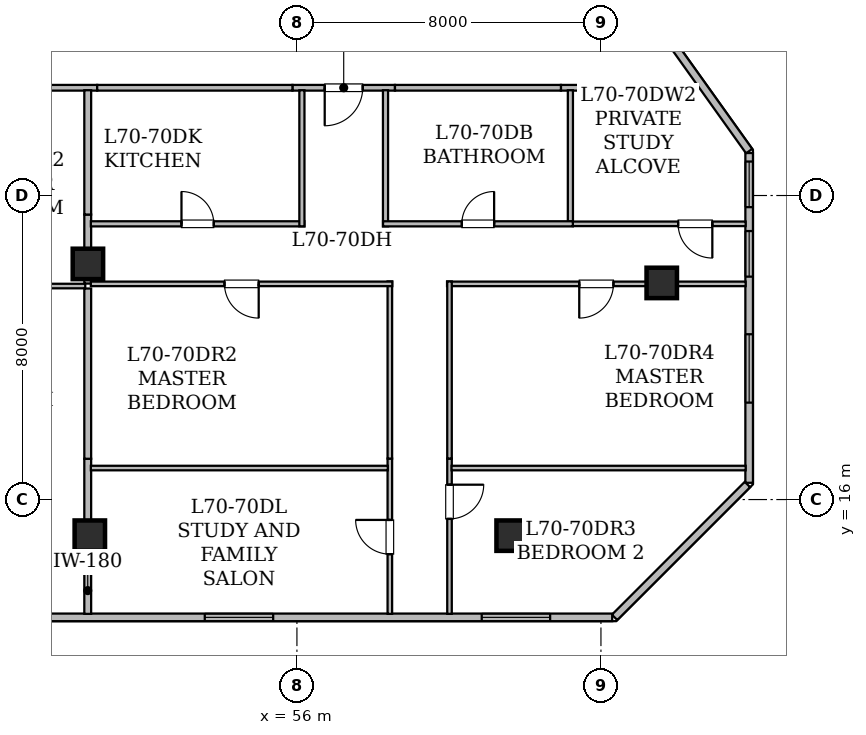
"""IFC4 building model, lengths in metres.
Left out: names, types, materials, properties, quantities, classifications, styles, units other than length and angle.
Written with IfcOpenShell. Run it as: python <this file> out.ifc"""

import sys

from ifc_helpers import new_model, si_unit, direction, frame, frame_2d, origin, origin_2d, place, context, subcontext, project, spatial, rectangle, hollow_rectangle, extrude, element, fill, save


model = new_model("IFC4")
c1 = context("Model", 3, precision=1e-05, world=origin(), true_north=direction((0.0, 1.0)))
c2 = subcontext(c1, "Body", "Model", "MODEL_VIEW")
j1 = project(units=[si_unit("LENGTHUNIT", "METRE"), si_unit("PLANEANGLEUNIT", "RADIAN")], contexts=[c1])
p1 = place(None, origin())
s1 = spatial("IfcSite", under=j1, at=p1, CompositionType="ELEMENT")
p2 = place(p1, origin())
s2 = spatial("IfcBuilding", under=s1, at=p2, CompositionType="ELEMENT")
p3 = place(p2, frame((0.0, 0.0, 273.65)))
s3 = spatial("IfcBuildingStorey", under=s2, at=p3, CompositionType="ELEMENT", Elevation=273.65)
for number, where, z_axis, x_axis in (
    (1, (50.55, 15.05, 0.0), (0.0, 0.0, 1.0), (1.0, 0.0, 0.0)),
    (2, (61.65, 15.05, 0.0), (0.0, 0.0, 1.0), (1.0, 0.0, 0.0)),
    (3, (65.6, 21.7, 0.0), (0.0, 0.0, 1.0), (1.0, 0.0, 0.0)),
):
    element("IfcColumn", number, at=place(p3, frame(where, z_axis=z_axis, x_axis=x_axis)), inside=s3, PredefinedType="COLUMN", context=c2, shape_type="SweptSolid", body=[
        extrude(hollow_rectangle(XDim=0.8, YDim=0.8, WallThickness=0.04, at=origin_2d()), origin(), (0.0, 0.0, 1.0), 4.175),
    ])
p4 = place(p3, frame((50.5, 22.2, 0.0), z_axis=(0.0, 0.0, 1.0), x_axis=(1.0, 0.0, 0.0)))
e4 = element("IfcColumn", 4, at=p4, inside=s3, PredefinedType="COLUMN", context=c2, shape_type="SweptSolid", body=[
    extrude(hollow_rectangle(XDim=0.8, YDim=0.8, WallThickness=0.04, at=origin_2d()), origin(), (0.0, 0.0, 1.0), 4.2),
])
p5 = place(p3, frame((65.926, 27.931, 0.0), z_axis=(0.0, 0.0, 1.0), x_axis=(0.581306204583, -0.813684887726, 0.0)))
e5 = element("IfcWall", 5, at=p5, inside=s3, PredefinedType="STANDARD", context=c2, shape_type="SweptSolid", body=[
    extrude(rectangle(XDim=3.396, YDim=0.2, at=frame_2d((1.698, 0.0))), origin(), (0.0, 0.0, 1.0), 3.78),
])
p6 = place(p3, frame((67.9, 25.118, 0.0), z_axis=(0.0, 0.0, 1.0), x_axis=(0.0, -1.0, 0.0)))
e6 = element("IfcWall", 6, at=p6, inside=s3, PredefinedType="STANDARD", context=c2, shape_type="SweptSolid", body=[
    extrude(rectangle(XDim=8.677, YDim=0.2, at=frame_2d((4.338, 0.0))), origin(), (0.0, 0.0, 1.0), 3.78),
])
p7 = place(p6, frame((0.224, 0.0, 0.78)))
e7 = element("IfcOpeningElement", 7, at=p7, cuts=e6, PredefinedType="OPENING", context=c2, shape_type="SweptSolid", body=[
    extrude(rectangle(XDim=1.2, YDim=1.5, at=frame_2d((0.6, 0.75))), frame((0.0, 0.11, 0.0), z_axis=(0.0, -1.0, 0.0), x_axis=(1.0, 0.0, 0.0)), (0.0, 0.0, 1.0), 0.22),
])
p8 = place(p6, frame((2.053, 0.0, 0.78)))
e8 = element("IfcOpeningElement", 8, at=p8, cuts=e6, PredefinedType="OPENING", context=c2, shape_type="SweptSolid", body=[
    extrude(rectangle(XDim=1.2, YDim=1.5, at=frame_2d((0.6, 0.75))), frame((0.0, 0.11, 0.0), z_axis=(0.0, -1.0, 0.0), x_axis=(1.0, 0.0, 0.0)), (0.0, 0.0, 1.0), 0.22),
])
p9 = place(p6, frame((4.768, 0.0, 0.85)))
e9 = element("IfcOpeningElement", 9, at=p9, cuts=e6, PredefinedType="OPENING", context=c2, shape_type="SweptSolid", body=[
    extrude(rectangle(XDim=1.8, YDim=0.92, at=frame_2d((0.9, 0.46))), frame((0.0, 0.11, 0.0), z_axis=(0.0, -1.0, 0.0), x_axis=(1.0, 0.0, 0.0)), (0.0, 0.0, 1.0), 0.22),
])
p10 = place(p3, frame((67.855, 16.396, 0.0), z_axis=(0.0, 0.0, 1.0), x_axis=(-0.707106781187, -0.707106781187, 0.0)))
e10 = element("IfcWall", 10, at=p10, inside=s3, PredefinedType="STANDARD", context=c2, shape_type="SweptSolid", body=[
    extrude(rectangle(XDim=4.944, YDim=0.2, at=frame_2d((2.472, 0.0))), origin(), (0.0, 0.0, 1.0), 3.78),
])
p11 = place(p3, frame((64.296, 12.9, 0.0), z_axis=(0.0, 0.0, 1.0), x_axis=(-1.0, 0.0, 0.0)))
e11 = element("IfcWall", 11, at=p11, inside=s3, PredefinedType="STANDARD", context=c2, shape_type="SweptSolid", body=[
    extrude(rectangle(XDim=38.593, YDim=0.2, at=frame_2d((19.296, 0.0))), origin(), (0.0, 0.0, 1.0), 3.78),
])
p12 = place(p11, frame((29.086, 0.0, 0.85)))
e12 = element("IfcOpeningElement", 12, at=p12, cuts=e11, PredefinedType="OPENING", context=c2, shape_type="SweptSolid", body=[
    extrude(rectangle(XDim=1.8, YDim=0.92, at=frame_2d((0.9, 0.46))), frame((0.0, 0.11, 0.0), z_axis=(0.0, -1.0, 0.0), x_axis=(1.0, 0.0, 0.0)), (0.0, 0.0, 1.0), 0.22),
])
p13 = place(p11, frame((18.761, 0.0, 0.78)))
e13 = element("IfcOpeningElement", 13, at=p13, cuts=e11, PredefinedType="OPENING", context=c2, shape_type="SweptSolid", body=[
    extrude(rectangle(XDim=1.2, YDim=1.5, at=frame_2d((0.6, 0.75))), frame((0.0, 0.11, 0.0), z_axis=(0.0, -1.0, 0.0), x_axis=(1.0, 0.0, 0.0)), (0.0, 0.0, 1.0), 0.22),
])
p14 = place(p11, frame((15.286, 0.0, 0.85)))
e14 = element("IfcOpeningElement", 14, at=p14, cuts=e11, PredefinedType="OPENING", context=c2, shape_type="SweptSolid", body=[
    extrude(rectangle(XDim=1.8, YDim=0.92, at=frame_2d((0.9, 0.46))), frame((0.0, 0.11, 0.0), z_axis=(0.0, -1.0, 0.0), x_axis=(1.0, 0.0, 0.0)), (0.0, 0.0, 1.0), 0.22),
])
p15 = place(p11, frame((8.921, 0.0, 0.85)))
e15 = element("IfcOpeningElement", 15, at=p15, cuts=e11, PredefinedType="OPENING", context=c2, shape_type="SweptSolid", body=[
    extrude(rectangle(XDim=1.8, YDim=0.92, at=frame_2d((0.9, 0.46))), frame((0.0, 0.11, 0.0), z_axis=(0.0, -1.0, 0.0), x_axis=(1.0, 0.0, 0.0)), (0.0, 0.0, 1.0), 0.22),
])
p16 = place(p11, frame((1.633, 0.0, 0.85)))
e16 = element("IfcOpeningElement", 16, at=p16, cuts=e11, PredefinedType="OPENING", context=c2, shape_type="SweptSolid", body=[
    extrude(rectangle(XDim=1.8, YDim=0.92, at=frame_2d((0.9, 0.46))), frame((0.0, 0.11, 0.0), z_axis=(0.0, -1.0, 0.0), x_axis=(1.0, 0.0, 0.0)), (0.0, 0.0, 1.0), 0.22),
])
p17 = place(p3, frame((50.744, 26.835, 0.0), z_axis=(0.0, 0.0, 1.0), x_axis=(-1.0, 0.0, 0.0)))
e17 = element("IfcWall", 17, at=p17, inside=s3, PredefinedType="STANDARD", context=c2, shape_type="SweptSolid", body=[
    extrude(rectangle(XDim=4.77, YDim=0.15, at=frame_2d((2.385, 0.0))), origin(), (0.0, 0.0, 1.0), 2.22),
])
p18 = place(p3, frame((63.69, 26.835, 0.0), z_axis=(0.0, 0.0, 1.0), x_axis=(-1.0, 0.0, 0.0)))
e18 = element("IfcWall", 18, at=p18, inside=s3, PredefinedType="STANDARD", context=c2, shape_type="SweptSolid", body=[
    extrude(rectangle(XDim=0.743, YDim=0.15, at=frame_2d((0.372, 0.0))), origin(), (0.0, 0.0, 1.0), 3.78),
])
p19 = place(p3, frame((58.58, 26.835, 0.0), z_axis=(0.0, 0.0, 1.0), x_axis=(-1.0, 0.0, 0.0)))
e19 = element("IfcWall", 19, at=p19, inside=s3, PredefinedType="STANDARD", context=c2, shape_type="SweptSolid", body=[
    extrude(rectangle(XDim=2.698, YDim=0.15, at=frame_2d((1.349, 0.0))), origin(), (0.0, 0.0, 1.0), 3.78),
])
p20 = place(p19, frame((0.849, 0.0, 0.0)))
e20 = element("IfcOpeningElement", 20, at=p20, cuts=e19, PredefinedType="OPENING", context=c2, shape_type="SweptSolid", body=[
    extrude(rectangle(XDim=1.0, YDim=2.15, at=frame_2d((0.5, 1.075))), frame((0.0, 0.085, 0.0), z_axis=(0.0, -1.0, 0.0), x_axis=(1.0, 0.0, 0.0)), (0.0, 0.0, 1.0), 0.17),
])
p21 = place(p3, frame((62.947, 26.835, 0.0), z_axis=(0.0, 0.0, 1.0), x_axis=(-1.0, 0.0, 0.0)))
e21 = element("IfcWall", 21, at=p21, inside=s3, PredefinedType="STANDARD", context=c2, shape_type="SweptSolid", body=[
    extrude(rectangle(XDim=4.367, YDim=0.15, at=frame_2d((2.184, 0.0))), origin(), (0.0, 0.0, 1.0), 3.78),
])
p22 = place(p3, frame((55.882, 26.835, 0.0), z_axis=(0.0, 0.0, 1.0), x_axis=(-1.0, 0.0, 0.0)))
e22 = element("IfcWall", 22, at=p22, inside=s3, PredefinedType="STANDARD", context=c2, shape_type="SweptSolid", body=[
    extrude(rectangle(XDim=5.138, YDim=0.15, at=frame_2d((2.569, 0.0))), origin(), (0.0, 0.0, 1.0), 2.22),
])
p23 = place(p3, frame((45.779, 21.618, 0.0), z_axis=(0.0, 0.0, 1.0), x_axis=(1.0, 0.0, 0.0)))
e23 = element("IfcWall", 23, at=p23, inside=s3, PredefinedType="PARTITIONING", context=c2, shape_type="SweptSolid", body=[
    extrude(rectangle(XDim=4.651, YDim=0.12, at=frame_2d((2.325, 0.0))), origin(), (0.0, 0.0, 1.0), 2.22),
])
p24 = place(p3, frame((50.495, 17.073, 0.0), z_axis=(0.0, 0.0, 1.0), x_axis=(0.0, -1.0, 0.0)))
e24 = element("IfcWall", 24, at=p24, inside=s3, PredefinedType="STANDARD", context=c2, shape_type="SweptSolid", body=[
    extrude(rectangle(XDim=4.081, YDim=0.18, at=frame_2d((2.041, 0.0))), origin(), (0.0, 0.0, 1.0), 2.22),
])
p25 = place(p3, frame((50.495, 21.553, 0.0), z_axis=(0.0, 0.0, 1.0), x_axis=(0.0, -1.0, 0.0)))
e25 = element("IfcWall", 25, at=p25, inside=s3, PredefinedType="STANDARD", context=c2, shape_type="SweptSolid", body=[
    extrude(rectangle(XDim=4.48, YDim=0.18, at=frame_2d((2.24, 0.0))), origin(), (0.0, 0.0, 1.0), 2.22),
])
p26 = place(p3, frame((50.495, 23.499, 0.0), z_axis=(0.0, 0.0, 1.0), x_axis=(0.0, -1.0, 0.0)))
e26 = element("IfcWall", 26, at=p26, inside=s3, PredefinedType="STANDARD", context=c2, shape_type="SweptSolid", body=[
    extrude(rectangle(XDim=1.816, YDim=0.18, at=frame_2d((0.908, 0.0))), origin(), (0.0, 0.0, 1.0), 2.22),
])
p27 = place(p3, frame((50.495, 26.77, 0.0), z_axis=(0.0, 0.0, 1.0), x_axis=(0.0, -1.0, 0.0)))
e27 = element("IfcWall", 27, at=p27, inside=s3, PredefinedType="STANDARD", context=c2, shape_type="SweptSolid", body=[
    extrude(rectangle(XDim=3.271, YDim=0.18, at=frame_2d((1.635, 0.0))), origin(), (0.0, 0.0, 1.0), 2.22),
])
p28 = place(p3, frame((67.808, 23.255, 0.0), z_axis=(0.0, 0.0, 1.0), x_axis=(-1.0, 0.0, 0.0)))
e28 = element("IfcWall", 28, at=p28, inside=s3, PredefinedType="PARTITIONING", context=c2, shape_type="SweptSolid", body=[
    extrude(rectangle(XDim=4.547, YDim=0.12, at=frame_2d((2.273, 0.0))), origin(), (0.0, 0.0, 1.0), 2.22),
])
p29 = place(p28, frame((0.877, 0.0, 0.0)))
e29 = element("IfcOpeningElement", 29, at=p29, cuts=e28, PredefinedType="OPENING", context=c2, shape_type="SweptSolid", body=[
    extrude(rectangle(XDim=0.9, YDim=2.1, at=frame_2d((0.45, 1.05))), frame((0.0, 0.07, 0.0), z_axis=(0.0, -1.0, 0.0), x_axis=(1.0, 0.0, 0.0)), (0.0, 0.0, 1.0), 0.14),
])
p30 = place(p3, frame((63.196, 23.32, 0.0), z_axis=(0.0, 0.0, 1.0), x_axis=(0.0, 1.0, 0.0)))
e30 = element("IfcWall", 30, at=p30, inside=s3, PredefinedType="PARTITIONING", context=c2, shape_type="SweptSolid", body=[
    extrude(rectangle(XDim=3.45, YDim=0.135, at=frame_2d((1.725, 0.0))), origin(), (0.0, 0.0, 1.0), 3.78),
])
p31 = place(p3, frame((58.331, 26.77, 0.0), z_axis=(0.0, 0.0, 1.0), x_axis=(0.0, -1.0, 0.0)))
e31 = element("IfcWall", 31, at=p31, inside=s3, PredefinedType="PARTITIONING", context=c2, shape_type="SweptSolid", body=[
    extrude(rectangle(XDim=3.58, YDim=0.135, at=frame_2d((1.79, 0.0))), origin(), (0.0, 0.0, 1.0), 3.78),
])
p32 = place(p3, frame((58.266, 23.255, 0.0), z_axis=(0.0, 0.0, 1.0), x_axis=(1.0, 0.0, 0.0)))
e32 = element("IfcWall", 32, at=p32, inside=s3, PredefinedType="PARTITIONING", context=c2, shape_type="SweptSolid", body=[
    extrude(rectangle(XDim=4.995, YDim=0.135, at=frame_2d((2.498, 0.0))), origin(), (0.0, 0.0, 1.0), 3.78),
])
p33 = place(p32, frame((2.073, 0.0, 0.0)))
e33 = element("IfcOpeningElement", 33, at=p33, cuts=e32, PredefinedType="OPENING", context=c2, shape_type="SweptSolid", body=[
    extrude(rectangle(XDim=0.85, YDim=2.1, at=frame_2d((0.425, 1.05))), frame((0.0, 0.077, 0.0), z_axis=(0.0, -1.0, 0.0), x_axis=(1.0, 0.0, 0.0)), (0.0, 0.0, 1.0), 0.155),
])
p34 = place(p3, frame((50.577, 23.255, 0.0), z_axis=(0.0, 0.0, 1.0), x_axis=(1.0, 0.0, 0.0)))
e34 = element("IfcWall", 34, at=p34, inside=s3, PredefinedType="PARTITIONING", context=c2, shape_type="SweptSolid", body=[
    extrude(rectangle(XDim=5.619, YDim=0.135, at=frame_2d((2.81, 0.0))), origin(), (0.0, 0.0, 1.0), 2.22),
])
p35 = place(p34, frame((2.385, 0.0, 0.0)))
e35 = element("IfcOpeningElement", 35, at=p35, cuts=e34, PredefinedType="OPENING", context=c2, shape_type="SweptSolid", body=[
    extrude(rectangle(XDim=0.85, YDim=2.1, at=frame_2d((0.425, 1.05))), frame((0.0, 0.077, 0.0), z_axis=(0.0, -1.0, 0.0), x_axis=(1.0, 0.0, 0.0)), (0.0, 0.0, 1.0), 0.155),
])
p36 = place(p3, frame((56.131, 23.19, 0.0), z_axis=(0.0, 0.0, 1.0), x_axis=(0.0, 1.0, 0.0)))
e36 = element("IfcWall", 36, at=p36, inside=s3, PredefinedType="PARTITIONING", context=c2, shape_type="SweptSolid", body=[
    extrude(rectangle(XDim=3.58, YDim=0.135, at=frame_2d((1.79, 0.0))), origin(), (0.0, 0.0, 1.0), 3.78),
])
p37 = place(p3, frame((58.445, 12.992, 0.0), z_axis=(0.0, 0.0, 1.0), x_axis=(0.0, 1.0, 0.0)))
e37 = element("IfcWall", 37, at=p37, inside=s3, PredefinedType="PARTITIONING", context=c2, shape_type="SweptSolid", body=[
    extrude(rectangle(XDim=4.086, YDim=0.12, at=frame_2d((2.043, 0.0))), origin(), (0.0, 0.0, 1.0), 2.22),
])
p38 = place(p37, frame((1.572, 0.0, 0.0)))
e38 = element("IfcOpeningElement", 38, at=p38, cuts=e37, PredefinedType="OPENING", context=c2, shape_type="SweptSolid", body=[
    extrude(rectangle(XDim=0.9, YDim=2.1, at=frame_2d((0.45, 1.05))), frame((0.0, 0.07, 0.0), z_axis=(0.0, -1.0, 0.0), x_axis=(1.0, 0.0, 0.0)), (0.0, 0.0, 1.0), 0.14),
])
p39 = place(p3, frame((58.445, 17.078, 0.0), z_axis=(0.0, 0.0, 1.0), x_axis=(0.0, 1.0, 0.0)))
e39 = element("IfcWall", 39, at=p39, inside=s3, PredefinedType="PARTITIONING", context=c2, shape_type="SweptSolid", body=[
    extrude(rectangle(XDim=4.662, YDim=0.12, at=frame_2d((2.331, 0.0))), origin(), (0.0, 0.0, 1.0), 2.22),
])
p40 = place(p3, frame((58.51, 21.675, 0.0), z_axis=(0.0, 0.0, 1.0), x_axis=(-1.0, 0.0, 0.0)))
e40 = element("IfcWall", 40, at=p40, inside=s3, PredefinedType="PARTITIONING", context=c2, shape_type="SweptSolid", body=[
    extrude(rectangle(XDim=7.933, YDim=0.12, at=frame_2d((3.967, 0.0))), origin(), (0.0, 0.0, 1.0), 2.22),
])
p41 = place(p40, frame((3.516, 0.0, 0.0)))
e41 = element("IfcOpeningElement", 41, at=p41, cuts=e40, PredefinedType="OPENING", context=c2, shape_type="SweptSolid", body=[
    extrude(rectangle(XDim=0.9, YDim=2.1, at=frame_2d((0.45, 1.05))), frame((0.0, 0.07, 0.0), z_axis=(0.0, -1.0, 0.0), x_axis=(1.0, 0.0, 0.0)), (0.0, 0.0, 1.0), 0.14),
])
p42 = place(p3, frame((60.015, 17.078, 0.0), z_axis=(0.0, 0.0, 1.0), x_axis=(0.0, -1.0, 0.0)))
e42 = element("IfcWall", 42, at=p42, inside=s3, PredefinedType="PARTITIONING", context=c2, shape_type="SweptSolid", body=[
    extrude(rectangle(XDim=4.086, YDim=0.12, at=frame_2d((2.043, 0.0))), origin(), (0.0, 0.0, 1.0), 2.22),
])
p43 = place(p42, frame((0.687, 0.0, 0.0)))
e43 = element("IfcOpeningElement", 43, at=p43, cuts=e42, PredefinedType="OPENING", context=c2, shape_type="SweptSolid", body=[
    extrude(rectangle(XDim=0.9, YDim=2.1, at=frame_2d((0.45, 1.05))), frame((0.0, 0.07, 0.0), z_axis=(0.0, -1.0, 0.0), x_axis=(1.0, 0.0, 0.0)), (0.0, 0.0, 1.0), 0.14),
])
p44 = place(p3, frame((67.808, 21.675, 0.0), z_axis=(0.0, 0.0, 1.0), x_axis=(-1.0, 0.0, 0.0)))
e44 = element("IfcWall", 44, at=p44, inside=s3, PredefinedType="PARTITIONING", context=c2, shape_type="SweptSolid", body=[
    extrude(rectangle(XDim=7.858, YDim=0.12, at=frame_2d((3.929, 0.0))), origin(), (0.0, 0.0, 1.0), 2.22),
])
p45 = place(p44, frame((3.479, 0.0, 0.0)))
e45 = element("IfcOpeningElement", 45, at=p45, cuts=e44, PredefinedType="OPENING", context=c2, shape_type="SweptSolid", body=[
    extrude(rectangle(XDim=0.9, YDim=2.1, at=frame_2d((0.45, 1.05))), frame((0.0, 0.07, 0.0), z_axis=(0.0, -1.0, 0.0), x_axis=(1.0, 0.0, 0.0)), (0.0, 0.0, 1.0), 0.14),
])
p46 = place(p3, frame((60.015, 21.74, 0.0), z_axis=(0.0, 0.0, 1.0), x_axis=(0.0, -1.0, 0.0)))
e46 = element("IfcWall", 46, at=p46, inside=s3, PredefinedType="PARTITIONING", context=c2, shape_type="SweptSolid", body=[
    extrude(rectangle(XDim=4.662, YDim=0.12, at=frame_2d((2.331, 0.0))), origin(), (0.0, 0.0, 1.0), 2.22),
])
p47 = place(p3, frame((50.577, 16.829, 0.0), z_axis=(0.0, 0.0, 1.0), x_axis=(1.0, 0.0, 0.0)))
e47 = element("IfcWall", 47, at=p47, inside=s3, PredefinedType="PARTITIONING", context=c2, shape_type="SweptSolid", body=[
    extrude(rectangle(XDim=7.814, YDim=0.12, at=frame_2d((3.907, 0.0))), origin(), (0.0, 0.0, 1.0), 2.22),
])
p48 = place(p3, frame((60.069, 16.829, 0.0), z_axis=(0.0, 0.0, 1.0), x_axis=(1.0, 0.0, 0.0)))
e48 = element("IfcWall", 48, at=p48, inside=s3, PredefinedType="PARTITIONING", context=c2, shape_type="SweptSolid", body=[
    extrude(rectangle(XDim=7.739, YDim=0.12, at=frame_2d((3.87, 0.0))), origin(), (0.0, 0.0, 1.0), 2.22),
])
p49 = place(p7, origin())
e49 = element("IfcWindow", 49, at=p49, inside=s3, PartitioningType="SINGLE_PANEL", PredefinedType="WINDOW", context=c2, shape_type="SweptSolid", body=[
    extrude(rectangle(XDim=1.2, YDim=1.5, at=frame_2d((0.6, 0.75))), frame((0.0, 0.03, 0.0), z_axis=(0.0, -1.0, 0.0), x_axis=(1.0, 0.0, 0.0)), (0.0, 0.0, 1.0), 0.06),
])
fill(e7, e49)
p50 = place(p8, origin())
e50 = element("IfcWindow", 50, at=p50, inside=s3, PartitioningType="SINGLE_PANEL", PredefinedType="WINDOW", context=c2, shape_type="SweptSolid", body=[
    extrude(rectangle(XDim=1.2, YDim=1.5, at=frame_2d((0.6, 0.75))), frame((0.0, 0.03, 0.0), z_axis=(0.0, -1.0, 0.0), x_axis=(1.0, 0.0, 0.0)), (0.0, 0.0, 1.0), 0.06),
])
fill(e8, e50)
p51 = place(p15, origin())
e51 = element("IfcWindow", 51, at=p51, inside=s3, PartitioningType="SINGLE_PANEL", PredefinedType="WINDOW", context=c2, shape_type="SweptSolid", body=[
    extrude(rectangle(XDim=1.8, YDim=0.92, at=frame_2d((0.9, 0.46))), frame((0.0, 0.03, 0.0), z_axis=(0.0, -1.0, 0.0), x_axis=(1.0, 0.0, 0.0)), (0.0, 0.0, 1.0), 0.06),
])
fill(e15, e51)
p52 = place(p16, origin())
e52 = element("IfcWindow", 52, at=p52, inside=s3, PartitioningType="SINGLE_PANEL", PredefinedType="WINDOW", context=c2, shape_type="SweptSolid", body=[
    extrude(rectangle(XDim=1.8, YDim=0.92, at=frame_2d((0.9, 0.46))), frame((0.0, 0.03, 0.0), z_axis=(0.0, -1.0, 0.0), x_axis=(1.0, 0.0, 0.0)), (0.0, 0.0, 1.0), 0.06),
])
fill(e16, e52)
p53 = place(p9, origin())
e53 = element("IfcWindow", 53, at=p53, inside=s3, PartitioningType="SINGLE_PANEL", PredefinedType="WINDOW", context=c2, shape_type="SweptSolid", body=[
    extrude(rectangle(XDim=1.8, YDim=0.92, at=frame_2d((0.9, 0.46))), frame((0.0, 0.03, 0.0), z_axis=(0.0, -1.0, 0.0), x_axis=(1.0, 0.0, 0.0)), (0.0, 0.0, 1.0), 0.06),
])
fill(e9, e53)
p54 = place(p20, origin())
e54 = element("IfcDoor", 54, at=p54, inside=s3, OperationType="SINGLE_SWING_RIGHT", PredefinedType="DOOR", context=c2, shape_type="SweptSolid", body=[
    extrude(rectangle(XDim=1.0, YDim=2.15, at=frame_2d((0.5, 1.075))), frame((0.0, 0.025, 0.0), z_axis=(0.0, -1.0, 0.0), x_axis=(1.0, 0.0, 0.0)), (0.0, 0.0, 1.0), 0.05),
])
fill(e20, e54)
p55 = place(p29, origin())
e55 = element("IfcDoor", 55, at=p55, inside=s3, OperationType="SINGLE_SWING_LEFT", PredefinedType="DOOR", context=c2, shape_type="SweptSolid", body=[
    extrude(rectangle(XDim=0.9, YDim=2.1, at=frame_2d((0.45, 1.05))), frame((0.0, 0.025, 0.0), z_axis=(0.0, -1.0, 0.0), x_axis=(1.0, 0.0, 0.0)), (0.0, 0.0, 1.0), 0.05),
])
fill(e29, e55)
p56 = place(p33, origin())
e56 = element("IfcDoor", 56, at=p56, inside=s3, OperationType="SINGLE_SWING_RIGHT", PredefinedType="DOOR", context=c2, shape_type="SweptSolid", body=[
    extrude(rectangle(XDim=0.85, YDim=2.1, at=frame_2d((0.425, 1.05))), frame((0.0, 0.025, 0.0), z_axis=(0.0, -1.0, 0.0), x_axis=(1.0, 0.0, 0.0)), (0.0, 0.0, 1.0), 0.05),
])
fill(e33, e56)
p57 = place(p35, origin())
e57 = element("IfcDoor", 57, at=p57, inside=s3, OperationType="SINGLE_SWING_LEFT", PredefinedType="DOOR", context=c2, shape_type="SweptSolid", body=[
    extrude(rectangle(XDim=0.85, YDim=2.1, at=frame_2d((0.425, 1.05))), frame((0.0, 0.025, 0.0), z_axis=(0.0, -1.0, 0.0), x_axis=(1.0, 0.0, 0.0)), (0.0, 0.0, 1.0), 0.05),
])
fill(e35, e57)
p58 = place(p38, origin())
e58 = element("IfcDoor", 58, at=p58, inside=s3, OperationType="SINGLE_SWING_RIGHT", PredefinedType="DOOR", context=c2, shape_type="SweptSolid", body=[
    extrude(rectangle(XDim=0.9, YDim=2.1, at=frame_2d((0.45, 1.05))), frame((0.0, 0.025, 0.0), z_axis=(0.0, -1.0, 0.0), x_axis=(1.0, 0.0, 0.0)), (0.0, 0.0, 1.0), 0.05),
])
fill(e38, e58)
p59 = place(p41, origin())
e59 = element("IfcDoor", 59, at=p59, inside=s3, OperationType="SINGLE_SWING_LEFT", PredefinedType="DOOR", context=c2, shape_type="SweptSolid", body=[
    extrude(rectangle(XDim=0.9, YDim=2.1, at=frame_2d((0.45, 1.05))), frame((0.0, 0.025, 0.0), z_axis=(0.0, -1.0, 0.0), x_axis=(1.0, 0.0, 0.0)), (0.0, 0.0, 1.0), 0.05),
])
fill(e41, e59)
p60 = place(p43, origin())
e60 = element("IfcDoor", 60, at=p60, inside=s3, OperationType="SINGLE_SWING_LEFT", PredefinedType="DOOR", context=c2, shape_type="SweptSolid", body=[
    extrude(rectangle(XDim=0.9, YDim=2.1, at=frame_2d((0.45, 1.05))), frame((0.0, 0.025, 0.0), z_axis=(0.0, -1.0, 0.0), x_axis=(1.0, 0.0, 0.0)), (0.0, 0.0, 1.0), 0.05),
])
fill(e43, e60)
p61 = place(p45, origin())
e61 = element("IfcDoor", 61, at=p61, inside=s3, OperationType="SINGLE_SWING_RIGHT", PredefinedType="DOOR", context=c2, shape_type="SweptSolid", body=[
    extrude(rectangle(XDim=0.9, YDim=2.1, at=frame_2d((0.45, 1.05))), frame((0.0, 0.025, 0.0), z_axis=(0.0, -1.0, 0.0), x_axis=(1.0, 0.0, 0.0)), (0.0, 0.0, 1.0), 0.05),
])
fill(e45, e61)
save(model, sys.argv[1])
